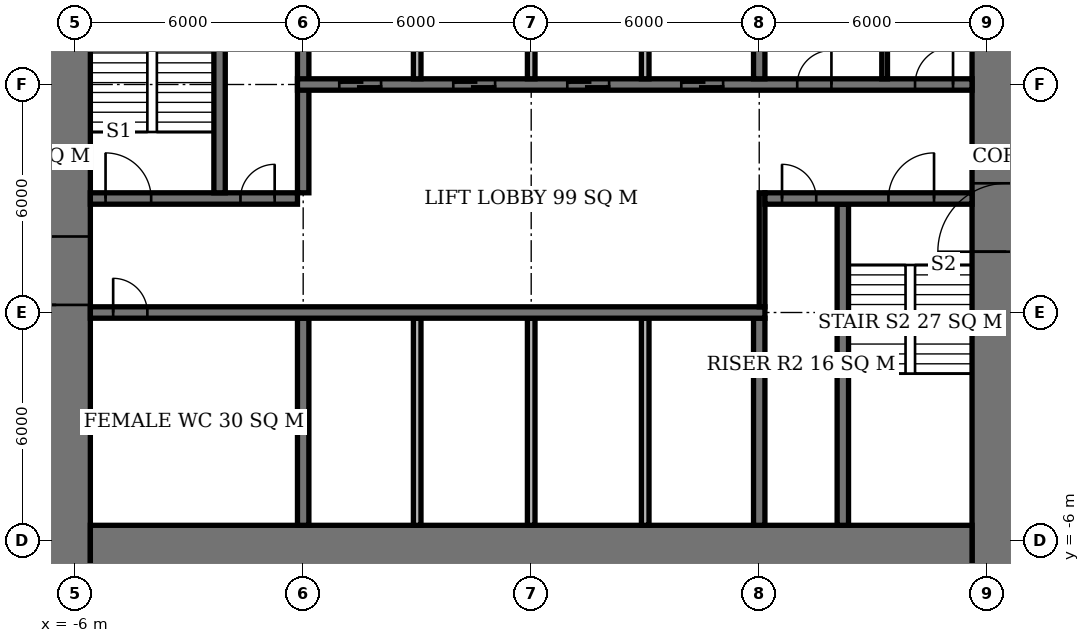
"""IFC4 building model, lengths in metres.
Left out: names, types, materials, properties, quantities, classifications, styles, units other than length and angle.
Written with IfcOpenShell. Run it as: python <this file> out.ifc"""

import sys

from ifc_helpers import new_model, si_unit, direction, frame, frame_2d, origin, place, context, subcontext, project, spatial, rectangle, extrude, element, fill, save


model = new_model("IFC4")
c1 = context("Model", 3, precision=1e-05, world=origin(), true_north=direction((0.0, 1.0)))
c2 = subcontext(c1, "Body", "Model", "MODEL_VIEW")
j1 = project(units=[si_unit("LENGTHUNIT", "METRE"), si_unit("PLANEANGLEUNIT", "RADIAN")], contexts=[c1])
p1 = place(None, origin())
s1 = spatial("IfcSite", under=j1, at=p1, CompositionType="ELEMENT")
p2 = place(p1, origin())
s2 = spatial("IfcBuilding", under=s1, at=p2, CompositionType="ELEMENT")
p3 = place(p2, frame((0.0, 0.0, 80.6)))
s3 = spatial("IfcBuildingStorey", under=s2, at=p3, CompositionType="ELEMENT", Elevation=80.6)
p4 = place(p3, frame((-5.6, -6.6, 0.0), z_axis=(0.0, 0.0, 1.0), x_axis=(1.0, 0.0, 0.0)))
e1 = element("IfcWall", 1, at=p4, inside=s3, PredefinedType="SHEAR", context=c2, shape_type="SweptSolid", body=[
    extrude(rectangle(XDim=23.2, YDim=2.0, at=frame_2d((11.6, 0.0))), origin(), (0.0, 0.0, 1.0), 3.9),
])
p5 = place(p3, frame((-6.5, -7.6, 0.0), z_axis=(0.0, 0.0, 1.0), x_axis=(0.0, 1.0, 0.0)))
e2 = element("IfcWall", 2, at=p5, inside=s3, PredefinedType="SHEAR", context=c2, shape_type="SweptSolid", body=[
    extrude(rectangle(XDim=21.2, YDim=1.8, at=frame_2d((10.6, 0.0))), origin(), (0.0, 0.0, 1.0), 3.9),
])
p6 = place(p5, frame((7.8, 0.0, 0.0)))
e3 = element("IfcOpeningElement", 3, at=p6, cuts=e2, PredefinedType="OPENING", context=c2, shape_type="SweptSolid", body=[
    extrude(rectangle(XDim=1.8, YDim=2.4, at=frame_2d((0.9, 1.2))), frame((0.0, 0.91, 0.0), z_axis=(0.0, -1.0, 0.0), x_axis=(1.0, 0.0, 0.0)), (0.0, 0.0, 1.0), 1.82),
])
p7 = place(p3, frame((18.5, -7.6, 0.0), z_axis=(0.0, 0.0, 1.0), x_axis=(0.0, 1.0, 0.0)))
e4 = element("IfcWall", 4, at=p7, inside=s3, PredefinedType="SHEAR", context=c2, shape_type="SweptSolid", body=[
    extrude(rectangle(XDim=21.2, YDim=1.8, at=frame_2d((10.6, 0.0))), origin(), (0.0, 0.0, 1.0), 3.9),
])
p8 = place(p7, frame((9.2, 0.0, 0.0)))
e5 = element("IfcOpeningElement", 5, at=p8, cuts=e4, PredefinedType="OPENING", context=c2, shape_type="SweptSolid", body=[
    extrude(rectangle(XDim=1.8, YDim=2.4, at=frame_2d((0.9, 1.2))), frame((0.0, 0.91, 0.0), z_axis=(0.0, -1.0, 0.0), x_axis=(1.0, 0.0, 0.0)), (0.0, 0.0, 1.0), 1.82),
])
p9 = place(p3, frame((-5.6, 0.0, 0.0), z_axis=(0.0, 0.0, 1.0), x_axis=(1.0, 0.0, 0.0)))
e6 = element("IfcWall", 6, at=p9, inside=s3, PredefinedType="SHEAR", context=c2, shape_type="SweptSolid", body=[
    extrude(rectangle(XDim=17.75, YDim=0.3, at=frame_2d((8.875, 0.0))), origin(), (0.0, 0.0, 1.0), 3.9),
])
p10 = place(p9, frame((0.6, 0.0, 0.0)))
e7 = element("IfcOpeningElement", 7, at=p10, cuts=e6, PredefinedType="OPENING", context=c2, shape_type="SweptSolid", body=[
    extrude(rectangle(XDim=0.9, YDim=2.1, at=frame_2d((0.45, 1.05))), frame((0.0, 0.16, 0.0), z_axis=(0.0, -1.0, 0.0), x_axis=(1.0, 0.0, 0.0)), (0.0, 0.0, 1.0), 0.32),
])
p11 = place(p3, frame((-5.6, 3.0, 0.0), z_axis=(0.0, 0.0, 1.0), x_axis=(1.0, 0.0, 0.0)))
e8 = element("IfcWall", 8, at=p11, inside=s3, PredefinedType="SHEAR", context=c2, shape_type="SweptSolid", body=[
    extrude(rectangle(XDim=5.45, YDim=0.3, at=frame_2d((2.725, 0.0))), origin(), (0.0, 0.0, 1.0), 3.9),
])
p12 = place(p11, frame((0.4, 0.0, 0.0)))
e9 = element("IfcOpeningElement", 9, at=p12, cuts=e8, PredefinedType="OPENING", context=c2, shape_type="SweptSolid", body=[
    extrude(rectangle(XDim=1.2, YDim=2.1, at=frame_2d((0.6, 1.05))), frame((0.0, 0.16, 0.0), z_axis=(0.0, -1.0, 0.0), x_axis=(1.0, 0.0, 0.0)), (0.0, 0.0, 1.0), 0.32),
])
p13 = place(p11, frame((3.95, 0.0, 0.0)))
e10 = element("IfcOpeningElement", 10, at=p13, cuts=e8, PredefinedType="OPENING", context=c2, shape_type="SweptSolid", body=[
    extrude(rectangle(XDim=0.9, YDim=2.1, at=frame_2d((0.45, 1.05))), frame((0.0, 0.16, 0.0), z_axis=(0.0, -1.0, 0.0), x_axis=(1.0, 0.0, 0.0)), (0.0, 0.0, 1.0), 0.32),
])
p14 = place(p3, frame((12.15, 3.0, 0.0), z_axis=(0.0, 0.0, 1.0), x_axis=(1.0, 0.0, 0.0)))
e11 = element("IfcWall", 11, at=p14, inside=s3, PredefinedType="SHEAR", context=c2, shape_type="SweptSolid", body=[
    extrude(rectangle(XDim=5.45, YDim=0.3, at=frame_2d((2.725, 0.0))), origin(), (0.0, 0.0, 1.0), 3.9),
])
p15 = place(p14, frame((3.25, 0.0, 0.0)))
e12 = element("IfcOpeningElement", 12, at=p15, cuts=e11, PredefinedType="OPENING", context=c2, shape_type="SweptSolid", body=[
    extrude(rectangle(XDim=1.2, YDim=2.1, at=frame_2d((0.6, 1.05))), frame((0.0, 0.16, 0.0), z_axis=(0.0, -1.0, 0.0), x_axis=(1.0, 0.0, 0.0)), (0.0, 0.0, 1.0), 0.32),
])
p16 = place(p14, frame((0.45, 0.0, 0.0)))
e13 = element("IfcOpeningElement", 13, at=p16, cuts=e11, PredefinedType="OPENING", context=c2, shape_type="SweptSolid", body=[
    extrude(rectangle(XDim=0.9, YDim=2.1, at=frame_2d((0.45, 1.05))), frame((0.0, 0.16, 0.0), z_axis=(0.0, -1.0, 0.0), x_axis=(1.0, 0.0, 0.0)), (0.0, 0.0, 1.0), 0.32),
])
p17 = place(p3, frame((-0.15, 6.0, 0.0), z_axis=(0.0, 0.0, 1.0), x_axis=(1.0, 0.0, 0.0)))
e14 = element("IfcWall", 14, at=p17, inside=s3, PredefinedType="SHEAR", context=c2, shape_type="SweptSolid", body=[
    extrude(rectangle(XDim=17.75, YDim=0.3, at=frame_2d((8.875, 0.0))), origin(), (0.0, 0.0, 1.0), 3.9),
])
p18 = place(p17, frame((13.15, 0.0, 0.0)))
e15 = element("IfcOpeningElement", 15, at=p18, cuts=e14, PredefinedType="OPENING", context=c2, shape_type="SweptSolid", body=[
    extrude(rectangle(XDim=0.9, YDim=2.1, at=frame_2d((0.45, 1.05))), frame((0.0, 0.16, 0.0), z_axis=(0.0, -1.0, 0.0), x_axis=(1.0, 0.0, 0.0)), (0.0, 0.0, 1.0), 0.32),
])
p19 = place(p17, frame((16.25, 0.0, 0.0)))
e16 = element("IfcOpeningElement", 16, at=p19, cuts=e14, PredefinedType="OPENING", context=c2, shape_type="SweptSolid", body=[
    extrude(rectangle(XDim=1.0, YDim=2.1, at=frame_2d((0.5, 1.05))), frame((0.0, 0.16, 0.0), z_axis=(0.0, -1.0, 0.0), x_axis=(1.0, 0.0, 0.0)), (0.0, 0.0, 1.0), 0.32),
])
p20 = place(p17, frame((1.1, 0.0, 0.0)))
e17 = element("IfcOpeningElement", 17, at=p20, cuts=e14, PredefinedType="OPENING", context=c2, shape_type="SweptSolid", body=[
    extrude(rectangle(XDim=1.1, YDim=2.1, at=frame_2d((0.55, 1.05))), frame((0.0, 0.16, 0.0), z_axis=(0.0, -1.0, 0.0), x_axis=(1.0, 0.0, 0.0)), (0.0, 0.0, 1.0), 0.32),
])
p21 = place(p17, frame((4.1, 0.0, 0.0)))
e18 = element("IfcOpeningElement", 18, at=p21, cuts=e14, PredefinedType="OPENING", context=c2, shape_type="SweptSolid", body=[
    extrude(rectangle(XDim=1.1, YDim=2.1, at=frame_2d((0.55, 1.05))), frame((0.0, 0.16, 0.0), z_axis=(0.0, -1.0, 0.0), x_axis=(1.0, 0.0, 0.0)), (0.0, 0.0, 1.0), 0.32),
])
p22 = place(p17, frame((7.1, 0.0, 0.0)))
e19 = element("IfcOpeningElement", 19, at=p22, cuts=e14, PredefinedType="OPENING", context=c2, shape_type="SweptSolid", body=[
    extrude(rectangle(XDim=1.1, YDim=2.1, at=frame_2d((0.55, 1.05))), frame((0.0, 0.16, 0.0), z_axis=(0.0, -1.0, 0.0), x_axis=(1.0, 0.0, 0.0)), (0.0, 0.0, 1.0), 0.32),
])
p23 = place(p17, frame((10.1, 0.0, 0.0)))
e20 = element("IfcOpeningElement", 20, at=p23, cuts=e14, PredefinedType="OPENING", context=c2, shape_type="SweptSolid", body=[
    extrude(rectangle(XDim=1.1, YDim=2.1, at=frame_2d((0.55, 1.05))), frame((0.0, 0.16, 0.0), z_axis=(0.0, -1.0, 0.0), x_axis=(1.0, 0.0, 0.0)), (0.0, 0.0, 1.0), 0.32),
])
p24 = place(p3, frame((0.0, -5.6, 0.0), z_axis=(0.0, 0.0, 1.0), x_axis=(0.0, 1.0, 0.0)))
e21 = element("IfcWall", 21, at=p24, inside=s3, PredefinedType="SHEAR", context=c2, shape_type="SweptSolid", body=[
    extrude(rectangle(XDim=5.45, YDim=0.3, at=frame_2d((2.725, 0.0))), origin(), (0.0, 0.0, 1.0), 3.9),
])
p25 = place(p3, frame((0.0, 3.15, 0.0), z_axis=(0.0, 0.0, 1.0), x_axis=(0.0, 1.0, 0.0)))
e22 = element("IfcWall", 22, at=p25, inside=s3, PredefinedType="SHEAR", context=c2, shape_type="SweptSolid", body=[
    extrude(rectangle(XDim=8.45, YDim=0.3, at=frame_2d((4.225, 0.0))), origin(), (0.0, 0.0, 1.0), 3.9),
])
for number, where, z_axis, x_axis in (
    (23, (12.0, -5.6, 0.0), (0.0, 0.0, 1.0), (0.0, 1.0, 0.0)),
    (24, (12.0, 6.15, 0.0), (0.0, 0.0, 1.0), (0.0, 1.0, 0.0)),
):
    element("IfcWall", number, at=place(p3, frame(where, z_axis=z_axis, x_axis=x_axis)), inside=s3, PredefinedType="SHEAR", context=c2, shape_type="SweptSolid", body=[
        extrude(rectangle(XDim=5.45, YDim=0.3, at=frame_2d((2.725, 0.0))), origin(), (0.0, 0.0, 1.0), 3.9),
    ])
for number, where, z_axis, x_axis in (
    (25, (-2.2, 3.15, 0.0), (0.0, 0.0, 1.0), (0.0, 1.0, 0.0)),
    (26, (14.2, -5.6, 0.0), (0.0, 0.0, 1.0), (0.0, 1.0, 0.0)),
):
    element("IfcWall", number, at=place(p3, frame(where, z_axis=z_axis, x_axis=x_axis)), inside=s3, PredefinedType="SHEAR", context=c2, shape_type="SweptSolid", body=[
        extrude(rectangle(XDim=8.45, YDim=0.3, at=frame_2d((4.225, 0.0))), origin(), (0.0, 0.0, 1.0), 3.9),
    ])
for number, where, z_axis, x_axis in (
    (27, (3.0, 6.15, 0.0), (0.0, 0.0, 1.0), (0.0, 1.0, 0.0)),
    (28, (6.0, 6.15, 0.0), (0.0, 0.0, 1.0), (0.0, 1.0, 0.0)),
    (29, (9.0, 6.15, 0.0), (0.0, 0.0, 1.0), (0.0, 1.0, 0.0)),
    (30, (3.0, -5.6, 0.0), (0.0, 0.0, 1.0), (0.0, 1.0, 0.0)),
    (31, (6.0, -5.6, 0.0), (0.0, 0.0, 1.0), (0.0, 1.0, 0.0)),
    (32, (9.0, -5.6, 0.0), (0.0, 0.0, 1.0), (0.0, 1.0, 0.0)),
):
    element("IfcWall", number, at=place(p3, frame(where, z_axis=z_axis, x_axis=x_axis)), inside=s3, PredefinedType="SOLIDWALL", context=c2, shape_type="SweptSolid", body=[
        extrude(rectangle(XDim=5.45, YDim=0.2, at=frame_2d((2.725, 0.0))), origin(), (0.0, 0.0, 1.0), 3.9),
    ])
p26 = place(p3, frame((15.3, 6.15, 0.0), z_axis=(0.0, 0.0, 1.0), x_axis=(0.0, 1.0, 0.0)))
e33 = element("IfcWall", 33, at=p26, inside=s3, PredefinedType="PLUMBINGWALL", context=c2, shape_type="SweptSolid", body=[
    extrude(rectangle(XDim=5.45, YDim=0.15, at=frame_2d((2.725, 0.0))), origin(), (0.0, 0.0, 1.0), 3.65),
])
p27 = place(p3, frame((12.075, 0.15, 0.0), z_axis=(0.0, 0.0, 1.0), x_axis=(0.0, 1.0, 0.0)))
e34 = element("IfcWall", 34, at=p27, inside=s3, PredefinedType="PARTITIONING", context=c2, shape_type="SweptSolid", body=[
    extrude(rectangle(XDim=3.0, YDim=0.15, at=frame_2d((1.5, 0.0))), origin(), (0.0, 0.0, 1.0), 3.65),
])
p28 = place(p6, origin())
e35 = element("IfcDoor", 35, at=p28, inside=s3, OperationType="DOUBLE_DOOR_SINGLE_SWING", PredefinedType="DOOR", context=c2, shape_type="SweptSolid", body=[
    extrude(rectangle(XDim=1.8, YDim=2.4, at=frame_2d((0.9, 1.2))), frame((0.0, 0.025, 0.0), z_axis=(0.0, -1.0, 0.0), x_axis=(1.0, 0.0, 0.0)), (0.0, 0.0, 1.0), 0.05),
])
fill(e3, e35)
p29 = place(p8, origin())
e36 = element("IfcDoor", 36, at=p29, inside=s3, OperationType="DOUBLE_DOOR_SINGLE_SWING", PredefinedType="DOOR", context=c2, shape_type="SweptSolid", body=[
    extrude(rectangle(XDim=1.8, YDim=2.4, at=frame_2d((0.9, 1.2))), frame((0.0, 0.025, 0.0), z_axis=(0.0, -1.0, 0.0), x_axis=(1.0, 0.0, 0.0)), (0.0, 0.0, 1.0), 0.05),
])
fill(e5, e36)
p30 = place(p12, origin())
e37 = element("IfcDoor", 37, at=p30, inside=s3, OperationType="SINGLE_SWING_LEFT", PredefinedType="DOOR", context=c2, shape_type="SweptSolid", body=[
    extrude(rectangle(XDim=1.2, YDim=2.1, at=frame_2d((0.6, 1.05))), frame((0.0, 0.025, 0.0), z_axis=(0.0, -1.0, 0.0), x_axis=(1.0, 0.0, 0.0)), (0.0, 0.0, 1.0), 0.05),
])
fill(e9, e37)
p31 = place(p13, origin())
e38 = element("IfcDoor", 38, at=p31, inside=s3, OperationType="SINGLE_SWING_RIGHT", PredefinedType="DOOR", context=c2, shape_type="SweptSolid", body=[
    extrude(rectangle(XDim=0.9, YDim=2.1, at=frame_2d((0.45, 1.05))), frame((0.0, 0.025, 0.0), z_axis=(0.0, -1.0, 0.0), x_axis=(1.0, 0.0, 0.0)), (0.0, 0.0, 1.0), 0.05),
])
fill(e10, e38)
p32 = place(p15, origin())
e39 = element("IfcDoor", 39, at=p32, inside=s3, OperationType="SINGLE_SWING_RIGHT", PredefinedType="DOOR", context=c2, shape_type="SweptSolid", body=[
    extrude(rectangle(XDim=1.2, YDim=2.1, at=frame_2d((0.6, 1.05))), frame((0.0, 0.025, 0.0), z_axis=(0.0, -1.0, 0.0), x_axis=(1.0, 0.0, 0.0)), (0.0, 0.0, 1.0), 0.05),
])
fill(e12, e39)
p33 = place(p16, origin())
e40 = element("IfcDoor", 40, at=p33, inside=s3, OperationType="SINGLE_SWING_LEFT", PredefinedType="DOOR", context=c2, shape_type="SweptSolid", body=[
    extrude(rectangle(XDim=0.9, YDim=2.1, at=frame_2d((0.45, 1.05))), frame((0.0, 0.025, 0.0), z_axis=(0.0, -1.0, 0.0), x_axis=(1.0, 0.0, 0.0)), (0.0, 0.0, 1.0), 0.05),
])
fill(e13, e40)
p34 = place(p10, origin())
e41 = element("IfcDoor", 41, at=p34, inside=s3, OperationType="SINGLE_SWING_LEFT", PredefinedType="DOOR", context=c2, shape_type="SweptSolid", body=[
    extrude(rectangle(XDim=0.9, YDim=2.1, at=frame_2d((0.45, 1.05))), frame((0.0, 0.025, 0.0), z_axis=(0.0, -1.0, 0.0), x_axis=(1.0, 0.0, 0.0)), (0.0, 0.0, 1.0), 0.05),
])
fill(e7, e41)
p35 = place(p18, origin())
e42 = element("IfcDoor", 42, at=p35, inside=s3, OperationType="SINGLE_SWING_RIGHT", PredefinedType="DOOR", context=c2, shape_type="SweptSolid", body=[
    extrude(rectangle(XDim=0.9, YDim=2.1, at=frame_2d((0.45, 1.05))), frame((0.0, 0.025, 0.0), z_axis=(0.0, -1.0, 0.0), x_axis=(1.0, 0.0, 0.0)), (0.0, 0.0, 1.0), 0.05),
])
fill(e15, e42)
p36 = place(p19, origin())
e43 = element("IfcDoor", 43, at=p36, inside=s3, OperationType="SINGLE_SWING_RIGHT", PredefinedType="DOOR", context=c2, shape_type="SweptSolid", body=[
    extrude(rectangle(XDim=1.0, YDim=2.1, at=frame_2d((0.5, 1.05))), frame((0.0, 0.025, 0.0), z_axis=(0.0, -1.0, 0.0), x_axis=(1.0, 0.0, 0.0)), (0.0, 0.0, 1.0), 0.05),
])
fill(e16, e43)
p37 = place(p20, origin())
e44 = element("IfcDoor", 44, at=p37, inside=s3, OperationType="DOUBLE_DOOR_SLIDING", PredefinedType="USERDEFINED", context=c2, shape_type="SweptSolid", body=[
    extrude(rectangle(XDim=1.1, YDim=2.1, at=frame_2d((0.55, 1.05))), frame((0.0, 0.025, 0.0), z_axis=(0.0, -1.0, 0.0), x_axis=(1.0, 0.0, 0.0)), (0.0, 0.0, 1.0), 0.05),
])
fill(e17, e44)
p38 = place(p21, origin())
e45 = element("IfcDoor", 45, at=p38, inside=s3, OperationType="DOUBLE_DOOR_SLIDING", PredefinedType="USERDEFINED", context=c2, shape_type="SweptSolid", body=[
    extrude(rectangle(XDim=1.1, YDim=2.1, at=frame_2d((0.55, 1.05))), frame((0.0, 0.025, 0.0), z_axis=(0.0, -1.0, 0.0), x_axis=(1.0, 0.0, 0.0)), (0.0, 0.0, 1.0), 0.05),
])
fill(e18, e45)
p39 = place(p22, origin())
e46 = element("IfcDoor", 46, at=p39, inside=s3, OperationType="DOUBLE_DOOR_SLIDING", PredefinedType="USERDEFINED", context=c2, shape_type="SweptSolid", body=[
    extrude(rectangle(XDim=1.1, YDim=2.1, at=frame_2d((0.55, 1.05))), frame((0.0, 0.025, 0.0), z_axis=(0.0, -1.0, 0.0), x_axis=(1.0, 0.0, 0.0)), (0.0, 0.0, 1.0), 0.05),
])
fill(e19, e46)
p40 = place(p23, origin())
e47 = element("IfcDoor", 47, at=p40, inside=s3, OperationType="DOUBLE_DOOR_SLIDING", PredefinedType="USERDEFINED", context=c2, shape_type="SweptSolid", body=[
    extrude(rectangle(XDim=1.1, YDim=2.1, at=frame_2d((0.55, 1.05))), frame((0.0, 0.025, 0.0), z_axis=(0.0, -1.0, 0.0), x_axis=(1.0, 0.0, 0.0)), (0.0, 0.0, 1.0), 0.05),
])
fill(e20, e47)
save(model, sys.argv[1])
